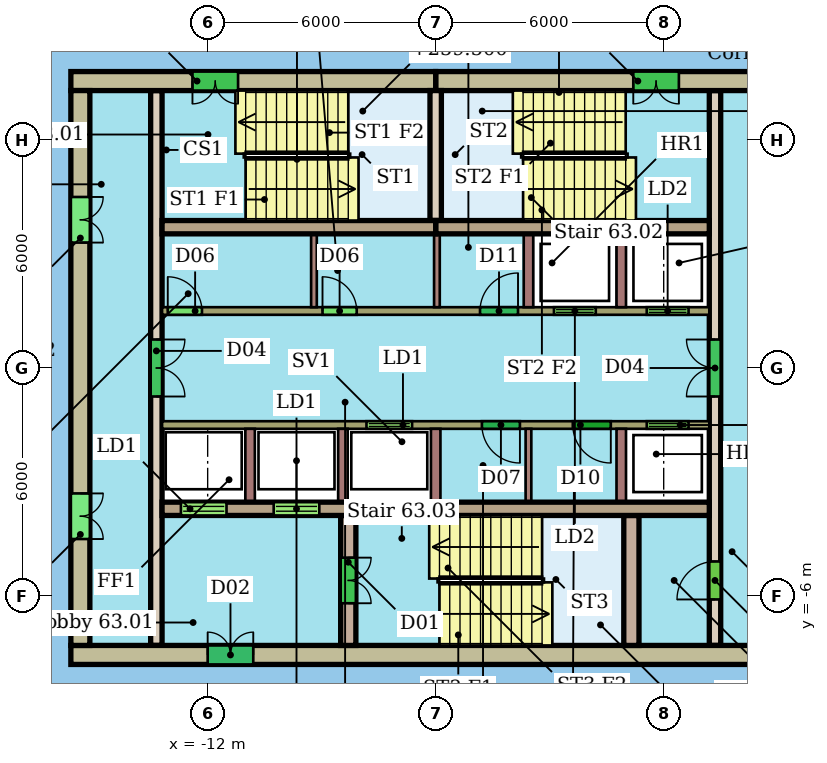
"""IFC4 building model, lengths in metres.
Left out: names, types, materials, properties, quantities, classifications, styles, units other than length and angle.
Written with IfcOpenShell. Run it as: python <this file> out.ifc"""

import sys

from ifc_helpers import new_model, si_unit, direction, frame, frame_2d, origin, place, context, subcontext, project, spatial, rectangle, extrude, element, fill, save


model = new_model("IFC4")
c1 = context("Model", 3, precision=1e-05, world=origin(), true_north=direction((0.0, 1.0)))
c2 = subcontext(c1, "Body", "Model", "MODEL_VIEW")
j1 = project(units=[si_unit("LENGTHUNIT", "METRE"), si_unit("PLANEANGLEUNIT", "RADIAN")], contexts=[c1])
p1 = place(None, origin())
s1 = spatial("IfcSite", under=j1, at=p1, CompositionType="ELEMENT")
p2 = place(p1, origin())
s2 = spatial("IfcBuilding", under=s1, at=p2, CompositionType="ELEMENT")
p3 = place(p2, frame((0.0, 0.0, 257.7)))
s3 = spatial("IfcBuildingStorey", under=s2, at=p3, CompositionType="ELEMENT", Elevation=257.7)
p4 = place(p3, frame((3.6, 7.55, 0.0), z_axis=(0.0, 0.0, 1.0), x_axis=(-1.0, 0.0, 0.0)))
e1 = element("IfcWall", 1, at=p4, inside=s3, PredefinedType="SHEAR", context=c2, shape_type="SweptSolid", body=[
    extrude(rectangle(XDim=9.6, YDim=0.5, at=frame_2d((4.8, 0.0))), origin(), (0.0, 0.0, 1.0), 3.3),
])
p5 = place(p4, frame((3.2, 0.0, 0.0)))
e2 = element("IfcOpeningElement", 2, at=p5, cuts=e1, PredefinedType="OPENING", context=c2, shape_type="SweptSolid", body=[
    extrude(rectangle(XDim=1.2, YDim=2.1, at=frame_2d((0.6, 1.05))), frame((0.0, 0.26, 0.0), z_axis=(0.0, -1.0, 0.0), x_axis=(1.0, 0.0, 0.0)), (0.0, 0.0, 1.0), 0.52),
])
p6 = place(p3, frame((-6.0, 7.55, 0.0), z_axis=(0.0, 0.0, 1.0), x_axis=(-1.0, 0.0, 0.0)))
e3 = element("IfcWall", 3, at=p6, inside=s3, PredefinedType="SHEAR", context=c2, shape_type="SweptSolid", body=[
    extrude(rectangle(XDim=9.6, YDim=0.5, at=frame_2d((4.8, 0.0))), origin(), (0.0, 0.0, 1.0), 3.3),
])
p7 = place(p6, frame((5.2, 0.0, 0.0)))
e4 = element("IfcOpeningElement", 4, at=p7, cuts=e3, PredefinedType="OPENING", context=c2, shape_type="SweptSolid", body=[
    extrude(rectangle(XDim=1.2, YDim=2.1, at=frame_2d((0.6, 1.05))), frame((0.0, 0.26, 0.0), z_axis=(0.0, -1.0, 0.0), x_axis=(1.0, 0.0, 0.0)), (0.0, 0.0, 1.0), 0.52),
])
p8 = place(p3, frame((-15.6, -7.55, 0.0), z_axis=(0.0, 0.0, 1.0), x_axis=(1.0, 0.0, 0.0)))
e5 = element("IfcWall", 5, at=p8, inside=s3, PredefinedType="SHEAR", context=c2, shape_type="SweptSolid", body=[
    extrude(rectangle(XDim=19.2, YDim=0.5, at=frame_2d((9.6, 0.0))), origin(), (0.0, 0.0, 1.0), 3.3),
])
p9 = place(p8, frame((3.6, 0.0, 0.0)))
e6 = element("IfcOpeningElement", 6, at=p9, cuts=e5, PredefinedType="OPENING", context=c2, shape_type="SweptSolid", body=[
    extrude(rectangle(XDim=1.2, YDim=2.1, at=frame_2d((0.6, 1.05))), frame((0.0, 0.26, 0.0), z_axis=(0.0, -1.0, 0.0), x_axis=(1.0, 0.0, 0.0)), (0.0, 0.0, 1.0), 0.52),
])
p10 = place(p3, frame((-15.35, 7.3, 0.0), z_axis=(0.0, 0.0, 1.0), x_axis=(0.0, -1.0, 0.0)))
e7 = element("IfcWall", 7, at=p10, inside=s3, PredefinedType="SHEAR", context=c2, shape_type="SweptSolid", body=[
    extrude(rectangle(XDim=14.6, YDim=0.5, at=frame_2d((7.3, 0.0))), origin(), (0.0, 0.0, 1.0), 3.3),
])
p11 = place(p10, frame((10.6, 0.0, 0.0)))
e8 = element("IfcOpeningElement", 8, at=p11, cuts=e7, PredefinedType="OPENING", context=c2, shape_type="SweptSolid", body=[
    extrude(rectangle(XDim=1.2, YDim=2.1, at=frame_2d((0.6, 1.05))), frame((0.0, 0.26, 0.0), z_axis=(0.0, -1.0, 0.0), x_axis=(1.0, 0.0, 0.0)), (0.0, 0.0, 1.0), 0.52),
])
p12 = place(p10, frame((2.8, 0.0, 0.0)))
e9 = element("IfcOpeningElement", 9, at=p12, cuts=e7, PredefinedType="OPENING", context=c2, shape_type="SweptSolid", body=[
    extrude(rectangle(XDim=1.2, YDim=2.1, at=frame_2d((0.6, 1.05))), frame((0.0, 0.26, 0.0), z_axis=(0.0, -1.0, 0.0), x_axis=(1.0, 0.0, 0.0)), (0.0, 0.0, 1.0), 0.52),
])
for number, where, z_axis, x_axis in (
    (10, (-13.2, 3.705, 0.0), (0.0, 0.0, 1.0), (1.0, 0.0, 0.0)),
    (11, (-6.0, 3.705, 0.0), (0.0, 0.0, 1.0), (1.0, 0.0, 0.0)),
):
    element("IfcWall", number, at=place(p3, frame(where, z_axis=z_axis, x_axis=x_axis)), inside=s3, PredefinedType="SHEAR", context=c2, shape_type="SweptSolid", body=[
        extrude(rectangle(XDim=7.2, YDim=0.35, at=frame_2d((3.6, 0.0))), origin(), (0.0, 0.0, 1.0), 3.3),
    ])
p13 = place(p3, frame((-13.2, -3.705, 0.0), z_axis=(0.0, 0.0, 1.0), x_axis=(1.0, 0.0, 0.0)))
e12 = element("IfcWall", 12, at=p13, inside=s3, PredefinedType="SHEAR", context=c2, shape_type="SweptSolid", body=[
    extrude(rectangle(XDim=7.2, YDim=0.35, at=frame_2d((3.6, 0.0))), origin(), (0.0, 0.0, 1.0), 3.3),
])
p14 = place(p13, frame((0.496, 0.0, 0.0)))
e13 = element("IfcOpeningElement", 13, at=p14, cuts=e12, PredefinedType="OPENING", context=c2, shape_type="SweptSolid", body=[
    extrude(rectangle(XDim=1.2, YDim=2.1, at=frame_2d((0.6, 1.05))), frame((0.0, 0.185, 0.0), z_axis=(0.0, -1.0, 0.0), x_axis=(1.0, 0.0, 0.0)), (0.0, 0.0, 1.0), 0.37),
])
p15 = place(p13, frame((2.938, 0.0, 0.0)))
e14 = element("IfcOpeningElement", 14, at=p15, cuts=e12, PredefinedType="OPENING", context=c2, shape_type="SweptSolid", body=[
    extrude(rectangle(XDim=1.2, YDim=2.1, at=frame_2d((0.6, 1.05))), frame((0.0, 0.185, 0.0), z_axis=(0.0, -1.0, 0.0), x_axis=(1.0, 0.0, 0.0)), (0.0, 0.0, 1.0), 0.37),
])
p16 = place(p3, frame((-6.0, -3.705, 0.0), z_axis=(0.0, 0.0, 1.0), x_axis=(1.0, 0.0, 0.0)))
e15 = element("IfcWall", 15, at=p16, inside=s3, PredefinedType="SHEAR", context=c2, shape_type="SweptSolid", body=[
    extrude(rectangle(XDim=7.2, YDim=0.35, at=frame_2d((3.6, 0.0))), origin(), (0.0, 0.0, 1.0), 3.3),
])
p17 = place(p3, frame((-13.35, 7.3, 0.0), z_axis=(0.0, 0.0, 1.0), x_axis=(0.0, -1.0, 0.0)))
e16 = element("IfcWall", 16, at=p17, inside=s3, PredefinedType="SHEAR", context=c2, shape_type="SweptSolid", body=[
    extrude(rectangle(XDim=14.6, YDim=0.3, at=frame_2d((7.3, 0.0))), origin(), (0.0, 0.0, 1.0), 3.3),
])
p18 = place(p17, frame((6.55, 0.0, 0.0)))
e17 = element("IfcOpeningElement", 17, at=p18, cuts=e16, PredefinedType="OPENING", context=c2, shape_type="SweptSolid", body=[
    extrude(rectangle(XDim=1.5, YDim=2.1, at=frame_2d((0.75, 1.05))), frame((0.0, 0.16, 0.0), z_axis=(0.0, -1.0, 0.0), x_axis=(1.0, 0.0, 0.0)), (0.0, 0.0, 1.0), 0.32),
])
p19 = place(p3, frame((1.35, -7.3, 0.0), z_axis=(0.0, 0.0, 1.0), x_axis=(0.0, 1.0, 0.0)))
e18 = element("IfcWall", 18, at=p19, inside=s3, PredefinedType="SHEAR", context=c2, shape_type="SweptSolid", body=[
    extrude(rectangle(XDim=14.6, YDim=0.3, at=frame_2d((7.3, 0.0))), origin(), (0.0, 0.0, 1.0), 3.3),
])
p20 = place(p19, frame((1.21, 0.0, 0.0)))
e19 = element("IfcOpeningElement", 19, at=p20, cuts=e18, PredefinedType="OPENING", context=c2, shape_type="SweptSolid", body=[
    extrude(rectangle(XDim=1.0, YDim=2.1, at=frame_2d((0.5, 1.05))), frame((0.0, 0.16, 0.0), z_axis=(0.0, -1.0, 0.0), x_axis=(1.0, 0.0, 0.0)), (0.0, 0.0, 1.0), 0.32),
])
p21 = place(p19, frame((6.55, 0.0, 0.0)))
e20 = element("IfcOpeningElement", 20, at=p21, cuts=e18, PredefinedType="OPENING", context=c2, shape_type="SweptSolid", body=[
    extrude(rectangle(XDim=1.5, YDim=2.1, at=frame_2d((0.75, 1.05))), frame((0.0, 0.16, 0.0), z_axis=(0.0, -1.0, 0.0), x_axis=(1.0, 0.0, 0.0)), (0.0, 0.0, 1.0), 0.32),
])
p22 = place(p3, frame((-13.2, 1.5, 0.0), z_axis=(0.0, 0.0, 1.0), x_axis=(1.0, 0.0, 0.0)))
e21 = element("IfcWall", 21, at=p22, inside=s3, PredefinedType="SHEAR", context=c2, shape_type="SweptSolid", body=[
    extrude(rectangle(XDim=14.4, YDim=0.2, at=frame_2d((7.2, 0.0))), origin(), (0.0, 0.0, 1.0), 3.3),
])
p23 = place(p22, frame((10.312, 0.0, 0.0)))
e22 = element("IfcOpeningElement", 22, at=p23, cuts=e21, PredefinedType="OPENING", context=c2, shape_type="SweptSolid", body=[
    extrude(rectangle(XDim=1.1, YDim=2.1, at=frame_2d((0.55, 1.05))), frame((0.0, 0.11, 0.0), z_axis=(0.0, -1.0, 0.0), x_axis=(1.0, 0.0, 0.0)), (0.0, 0.0, 1.0), 0.22),
])
p24 = place(p22, frame((12.754, 0.0, 0.0)))
e23 = element("IfcOpeningElement", 23, at=p24, cuts=e21, PredefinedType="OPENING", context=c2, shape_type="SweptSolid", body=[
    extrude(rectangle(XDim=1.1, YDim=2.1, at=frame_2d((0.55, 1.05))), frame((0.0, 0.11, 0.0), z_axis=(0.0, -1.0, 0.0), x_axis=(1.0, 0.0, 0.0)), (0.0, 0.0, 1.0), 0.22),
])
p25 = place(p22, frame((0.15, 0.0, 0.0)))
e24 = element("IfcOpeningElement", 24, at=p25, cuts=e21, PredefinedType="OPENING", context=c2, shape_type="SweptSolid", body=[
    extrude(rectangle(XDim=0.9, YDim=2.1, at=frame_2d((0.45, 1.05))), frame((0.0, 0.11, 0.0), z_axis=(0.0, -1.0, 0.0), x_axis=(1.0, 0.0, 0.0)), (0.0, 0.0, 1.0), 0.22),
])
p26 = place(p22, frame((4.222, 0.0, 0.0)))
e25 = element("IfcOpeningElement", 25, at=p26, cuts=e21, PredefinedType="OPENING", context=c2, shape_type="SweptSolid", body=[
    extrude(rectangle(XDim=0.9, YDim=2.1, at=frame_2d((0.45, 1.05))), frame((0.0, 0.11, 0.0), z_axis=(0.0, -1.0, 0.0), x_axis=(1.0, 0.0, 0.0)), (0.0, 0.0, 1.0), 0.22),
])
p27 = place(p22, frame((8.367, 0.0, 0.0)))
e26 = element("IfcOpeningElement", 26, at=p27, cuts=e21, PredefinedType="OPENING", context=c2, shape_type="SweptSolid", body=[
    extrude(rectangle(XDim=1.0, YDim=2.1, at=frame_2d((0.5, 1.05))), frame((0.0, 0.11, 0.0), z_axis=(0.0, -1.0, 0.0), x_axis=(1.0, 0.0, 0.0)), (0.0, 0.0, 1.0), 0.22),
])
p28 = place(p3, frame((1.2, -1.5, 0.0), z_axis=(0.0, 0.0, 1.0), x_axis=(-1.0, 0.0, 0.0)))
e27 = element("IfcWall", 27, at=p28, inside=s3, PredefinedType="SHEAR", context=c2, shape_type="SweptSolid", body=[
    extrude(rectangle(XDim=14.4, YDim=0.2, at=frame_2d((7.2, 0.0))), origin(), (0.0, 0.0, 1.0), 3.3),
])
p29 = place(p28, frame((7.821, 0.0, 0.0)))
e28 = element("IfcOpeningElement", 28, at=p29, cuts=e27, PredefinedType="OPENING", context=c2, shape_type="SweptSolid", body=[
    extrude(rectangle(XDim=1.2, YDim=2.1, at=frame_2d((0.6, 1.05))), frame((0.0, 0.11, 0.0), z_axis=(0.0, -1.0, 0.0), x_axis=(1.0, 0.0, 0.0)), (0.0, 0.0, 1.0), 0.22),
])
p30 = place(p28, frame((0.546, 0.0, 0.0)))
e29 = element("IfcOpeningElement", 29, at=p30, cuts=e27, PredefinedType="OPENING", context=c2, shape_type="SweptSolid", body=[
    extrude(rectangle(XDim=1.1, YDim=2.1, at=frame_2d((0.55, 1.05))), frame((0.0, 0.11, 0.0), z_axis=(0.0, -1.0, 0.0), x_axis=(1.0, 0.0, 0.0)), (0.0, 0.0, 1.0), 0.22),
])
p31 = place(p28, frame((4.983, 0.0, 0.0)))
e30 = element("IfcOpeningElement", 30, at=p31, cuts=e27, PredefinedType="OPENING", context=c2, shape_type="SweptSolid", body=[
    extrude(rectangle(XDim=1.0, YDim=2.1, at=frame_2d((0.5, 1.05))), frame((0.0, 0.11, 0.0), z_axis=(0.0, -1.0, 0.0), x_axis=(1.0, 0.0, 0.0)), (0.0, 0.0, 1.0), 0.22),
])
p32 = place(p28, frame((2.592, 0.0, 0.0)))
e31 = element("IfcOpeningElement", 31, at=p32, cuts=e27, PredefinedType="OPENING", context=c2, shape_type="SweptSolid", body=[
    extrude(rectangle(XDim=1.0, YDim=2.1, at=frame_2d((0.5, 1.05))), frame((0.0, 0.11, 0.0), z_axis=(0.0, -1.0, 0.0), x_axis=(1.0, 0.0, 0.0)), (0.0, 0.0, 1.0), 0.22),
])
p33 = place(p3, frame((-8.3, -3.88, 0.0), z_axis=(0.0, 0.0, 1.0), x_axis=(0.0, -1.0, 0.0)))
e32 = element("IfcWall", 32, at=p33, inside=s3, PredefinedType="SHEAR", context=c2, shape_type="SweptSolid", body=[
    extrude(rectangle(XDim=3.42, YDim=0.4, at=frame_2d((1.71, 0.0))), origin(), (0.0, 0.0, 1.0), 3.3),
])
p34 = place(p33, frame((1.11, 0.0, 0.0)))
e33 = element("IfcOpeningElement", 33, at=p34, cuts=e32, PredefinedType="OPENING", context=c2, shape_type="SweptSolid", body=[
    extrude(rectangle(XDim=1.2, YDim=2.1, at=frame_2d((0.6, 1.05))), frame((0.0, 0.21, 0.0), z_axis=(0.0, -1.0, 0.0), x_axis=(1.0, 0.0, 0.0)), (0.0, 0.0, 1.0), 0.42),
])
p35 = place(p3, frame((-0.85, -3.88, 0.0), z_axis=(0.0, 0.0, 1.0), x_axis=(0.0, -1.0, 0.0)))
e34 = element("IfcWall", 34, at=p35, inside=s3, PredefinedType="SHEAR", context=c2, shape_type="SweptSolid", body=[
    extrude(rectangle(XDim=3.42, YDim=0.4, at=frame_2d((1.71, 0.0))), origin(), (0.0, 0.0, 1.0), 3.3),
])
p36 = place(p3, frame((-6.0, 3.88, 0.0), z_axis=(0.0, 0.0, 1.0), x_axis=(0.0, 1.0, 0.0)))
e35 = element("IfcWall", 35, at=p36, inside=s3, PredefinedType="SHEAR", context=c2, shape_type="SweptSolid", body=[
    extrude(rectangle(XDim=3.42, YDim=0.3, at=frame_2d((1.71, 0.0))), origin(), (0.0, 0.0, 1.0), 3.3),
])
for number, where, z_axis, x_axis in (
    (36, (-3.558, 1.6, 0.0), (0.0, 0.0, 1.0), (0.0, 1.0, 0.0)),
    (37, (-1.117, 1.6, 0.0), (0.0, 0.0, 1.0), (0.0, 1.0, 0.0)),
):
    element("IfcWall", number, at=place(p3, frame(where, z_axis=z_axis, x_axis=x_axis)), inside=s3, PredefinedType="SHEAR", context=c2, shape_type="SweptSolid", body=[
        extrude(rectangle(XDim=1.93, YDim=0.25, at=frame_2d((0.965, 0.0))), origin(), (0.0, 0.0, 1.0), 3.3),
    ])
for number, where, z_axis, x_axis in (
    (38, (-9.203, 1.6, 0.0), (0.0, 0.0, 1.0), (0.0, 1.0, 0.0)),
    (39, (-5.967, 1.6, 0.0), (0.0, 0.0, 1.0), (0.0, 1.0, 0.0)),
):
    element("IfcWall", number, at=place(p3, frame(where, z_axis=z_axis, x_axis=x_axis)), inside=s3, PredefinedType="PARTITIONING", context=c2, shape_type="SweptSolid", body=[
        extrude(rectangle(XDim=1.93, YDim=0.15, at=frame_2d((0.965, 0.0))), origin(), (0.0, 0.0, 1.0), 3.3),
    ])
for number, where, z_axis, x_axis in (
    (40, (-10.883, -1.6, 0.0), (0.0, 0.0, 1.0), (0.0, -1.0, 0.0)),
    (41, (-8.442, -1.6, 0.0), (0.0, 0.0, 1.0), (0.0, -1.0, 0.0)),
    (42, (-6.0, -1.6, 0.0), (0.0, 0.0, 1.0), (0.0, -1.0, 0.0)),
    (43, (-1.117, -1.6, 0.0), (0.0, 0.0, 1.0), (0.0, -1.0, 0.0)),
):
    element("IfcWall", number, at=place(p3, frame(where, z_axis=z_axis, x_axis=x_axis)), inside=s3, PredefinedType="SHEAR", context=c2, shape_type="SweptSolid", body=[
        extrude(rectangle(XDim=1.93, YDim=0.25, at=frame_2d((0.965, 0.0))), origin(), (0.0, 0.0, 1.0), 3.3),
    ])
p37 = place(p3, frame((-3.558, -1.6, 0.0), z_axis=(0.0, 0.0, 1.0), x_axis=(0.0, -1.0, 0.0)))
e44 = element("IfcWall", 44, at=p37, inside=s3, PredefinedType="PARTITIONING", context=c2, shape_type="SweptSolid", body=[
    extrude(rectangle(XDim=1.93, YDim=0.15, at=frame_2d((0.965, 0.0))), origin(), (0.0, 0.0, 1.0), 3.3),
])
p38 = place(p5, origin())
e45 = element("IfcDoor", 45, at=p38, inside=s3, OperationType="DOUBLE_DOOR_SINGLE_SWING", PredefinedType="NOTDEFINED", context=c2, shape_type="SweptSolid", body=[
    extrude(rectangle(XDim=1.2, YDim=2.1, at=frame_2d((0.6, 1.05))), frame((0.0, 0.025, 0.0), z_axis=(0.0, -1.0, 0.0), x_axis=(1.0, 0.0, 0.0)), (0.0, 0.0, 1.0), 0.05),
])
fill(e2, e45)
p39 = place(p7, origin())
e46 = element("IfcDoor", 46, at=p39, inside=s3, OperationType="DOUBLE_DOOR_SINGLE_SWING", PredefinedType="NOTDEFINED", context=c2, shape_type="SweptSolid", body=[
    extrude(rectangle(XDim=1.2, YDim=2.1, at=frame_2d((0.6, 1.05))), frame((0.0, 0.025, 0.0), z_axis=(0.0, -1.0, 0.0), x_axis=(1.0, 0.0, 0.0)), (0.0, 0.0, 1.0), 0.05),
])
fill(e4, e46)
p40 = place(p9, origin())
e47 = element("IfcDoor", 47, at=p40, inside=s3, OperationType="DOUBLE_DOOR_SINGLE_SWING", PredefinedType="NOTDEFINED", context=c2, shape_type="SweptSolid", body=[
    extrude(rectangle(XDim=1.2, YDim=2.1, at=frame_2d((0.6, 1.05))), frame((0.0, 0.025, 0.0), z_axis=(0.0, -1.0, 0.0), x_axis=(1.0, 0.0, 0.0)), (0.0, 0.0, 1.0), 0.05),
])
fill(e6, e47)
p41 = place(p11, origin())
e48 = element("IfcDoor", 48, at=p41, inside=s3, OperationType="DOUBLE_DOOR_SINGLE_SWING", PredefinedType="NOTDEFINED", context=c2, shape_type="SweptSolid", body=[
    extrude(rectangle(XDim=1.2, YDim=2.1, at=frame_2d((0.6, 1.05))), frame((0.0, 0.025, 0.0), z_axis=(0.0, -1.0, 0.0), x_axis=(1.0, 0.0, 0.0)), (0.0, 0.0, 1.0), 0.05),
])
fill(e8, e48)
p42 = place(p12, origin())
e49 = element("IfcDoor", 49, at=p42, inside=s3, OperationType="DOUBLE_DOOR_SINGLE_SWING", PredefinedType="NOTDEFINED", context=c2, shape_type="SweptSolid", body=[
    extrude(rectangle(XDim=1.2, YDim=2.1, at=frame_2d((0.6, 1.05))), frame((0.0, 0.025, 0.0), z_axis=(0.0, -1.0, 0.0), x_axis=(1.0, 0.0, 0.0)), (0.0, 0.0, 1.0), 0.05),
])
fill(e9, e49)
p43 = place(p14, origin())
e50 = element("IfcDoor", 50, at=p43, inside=s3, OperationType="DOUBLE_DOOR_SLIDING", PredefinedType="NOTDEFINED", context=c2, shape_type="SweptSolid", body=[
    extrude(rectangle(XDim=1.2, YDim=2.1, at=frame_2d((0.6, 1.05))), frame((0.0, 0.025, 0.0), z_axis=(0.0, -1.0, 0.0), x_axis=(1.0, 0.0, 0.0)), (0.0, 0.0, 1.0), 0.05),
])
fill(e13, e50)
p44 = place(p15, origin())
e51 = element("IfcDoor", 51, at=p44, inside=s3, OperationType="DOUBLE_DOOR_SLIDING", PredefinedType="NOTDEFINED", context=c2, shape_type="SweptSolid", body=[
    extrude(rectangle(XDim=1.2, YDim=2.1, at=frame_2d((0.6, 1.05))), frame((0.0, 0.025, 0.0), z_axis=(0.0, -1.0, 0.0), x_axis=(1.0, 0.0, 0.0)), (0.0, 0.0, 1.0), 0.05),
])
fill(e14, e51)
p45 = place(p18, origin())
e52 = element("IfcDoor", 52, at=p45, inside=s3, OperationType="DOUBLE_DOOR_SINGLE_SWING", PredefinedType="NOTDEFINED", context=c2, shape_type="SweptSolid", body=[
    extrude(rectangle(XDim=1.5, YDim=2.1, at=frame_2d((0.75, 1.05))), frame((0.0, 0.025, 0.0), z_axis=(0.0, -1.0, 0.0), x_axis=(1.0, 0.0, 0.0)), (0.0, 0.0, 1.0), 0.05),
])
fill(e17, e52)
p46 = place(p20, origin())
e53 = element("IfcDoor", 53, at=p46, inside=s3, OperationType="SINGLE_SWING_LEFT", PredefinedType="NOTDEFINED", context=c2, shape_type="SweptSolid", body=[
    extrude(rectangle(XDim=1.0, YDim=2.1, at=frame_2d((0.5, 1.05))), frame((0.0, 0.025, 0.0), z_axis=(0.0, -1.0, 0.0), x_axis=(1.0, 0.0, 0.0)), (0.0, 0.0, 1.0), 0.05),
])
fill(e19, e53)
p47 = place(p21, origin())
e54 = element("IfcDoor", 54, at=p47, inside=s3, OperationType="DOUBLE_DOOR_SINGLE_SWING", PredefinedType="NOTDEFINED", context=c2, shape_type="SweptSolid", body=[
    extrude(rectangle(XDim=1.5, YDim=2.1, at=frame_2d((0.75, 1.05))), frame((0.0, 0.025, 0.0), z_axis=(0.0, -1.0, 0.0), x_axis=(1.0, 0.0, 0.0)), (0.0, 0.0, 1.0), 0.05),
])
fill(e20, e54)
p48 = place(p23, origin())
e55 = element("IfcDoor", 55, at=p48, inside=s3, OperationType="DOUBLE_DOOR_SLIDING", PredefinedType="NOTDEFINED", context=c2, shape_type="SweptSolid", body=[
    extrude(rectangle(XDim=1.1, YDim=2.1, at=frame_2d((0.55, 1.05))), frame((0.0, 0.025, 0.0), z_axis=(0.0, -1.0, 0.0), x_axis=(1.0, 0.0, 0.0)), (0.0, 0.0, 1.0), 0.05),
])
fill(e22, e55)
p49 = place(p24, origin())
e56 = element("IfcDoor", 56, at=p49, inside=s3, OperationType="DOUBLE_DOOR_SLIDING", PredefinedType="NOTDEFINED", context=c2, shape_type="SweptSolid", body=[
    extrude(rectangle(XDim=1.1, YDim=2.1, at=frame_2d((0.55, 1.05))), frame((0.0, 0.025, 0.0), z_axis=(0.0, -1.0, 0.0), x_axis=(1.0, 0.0, 0.0)), (0.0, 0.0, 1.0), 0.05),
])
fill(e23, e56)
p50 = place(p25, origin())
e57 = element("IfcDoor", 57, at=p50, inside=s3, OperationType="SINGLE_SWING_LEFT", PredefinedType="NOTDEFINED", context=c2, shape_type="SweptSolid", body=[
    extrude(rectangle(XDim=0.9, YDim=2.1, at=frame_2d((0.45, 1.05))), frame((0.0, 0.025, 0.0), z_axis=(0.0, -1.0, 0.0), x_axis=(1.0, 0.0, 0.0)), (0.0, 0.0, 1.0), 0.05),
])
fill(e24, e57)
p51 = place(p26, origin())
e58 = element("IfcDoor", 58, at=p51, inside=s3, OperationType="SINGLE_SWING_LEFT", PredefinedType="NOTDEFINED", context=c2, shape_type="SweptSolid", body=[
    extrude(rectangle(XDim=0.9, YDim=2.1, at=frame_2d((0.45, 1.05))), frame((0.0, 0.025, 0.0), z_axis=(0.0, -1.0, 0.0), x_axis=(1.0, 0.0, 0.0)), (0.0, 0.0, 1.0), 0.05),
])
fill(e25, e58)
p52 = place(p27, origin())
e59 = element("IfcDoor", 59, at=p52, inside=s3, OperationType="SINGLE_SWING_RIGHT", PredefinedType="NOTDEFINED", context=c2, shape_type="SweptSolid", body=[
    extrude(rectangle(XDim=1.0, YDim=2.1, at=frame_2d((0.5, 1.05))), frame((0.0, 0.025, 0.0), z_axis=(0.0, -1.0, 0.0), x_axis=(1.0, 0.0, 0.0)), (0.0, 0.0, 1.0), 0.05),
])
fill(e26, e59)
p53 = place(p29, origin())
e60 = element("IfcDoor", 60, at=p53, inside=s3, OperationType="DOUBLE_DOOR_SLIDING", PredefinedType="NOTDEFINED", context=c2, shape_type="SweptSolid", body=[
    extrude(rectangle(XDim=1.2, YDim=2.1, at=frame_2d((0.6, 1.05))), frame((0.0, 0.025, 0.0), z_axis=(0.0, -1.0, 0.0), x_axis=(1.0, 0.0, 0.0)), (0.0, 0.0, 1.0), 0.05),
])
fill(e28, e60)
p54 = place(p30, origin())
e61 = element("IfcDoor", 61, at=p54, inside=s3, OperationType="DOUBLE_DOOR_SLIDING", PredefinedType="NOTDEFINED", context=c2, shape_type="SweptSolid", body=[
    extrude(rectangle(XDim=1.1, YDim=2.1, at=frame_2d((0.55, 1.05))), frame((0.0, 0.025, 0.0), z_axis=(0.0, -1.0, 0.0), x_axis=(1.0, 0.0, 0.0)), (0.0, 0.0, 1.0), 0.05),
])
fill(e29, e61)
p55 = place(p31, origin())
e62 = element("IfcDoor", 62, at=p55, inside=s3, OperationType="SINGLE_SWING_LEFT", PredefinedType="NOTDEFINED", context=c2, shape_type="SweptSolid", body=[
    extrude(rectangle(XDim=1.0, YDim=2.1, at=frame_2d((0.5, 1.05))), frame((0.0, 0.025, 0.0), z_axis=(0.0, -1.0, 0.0), x_axis=(1.0, 0.0, 0.0)), (0.0, 0.0, 1.0), 0.05),
])
fill(e30, e62)
p56 = place(p32, origin())
e63 = element("IfcDoor", 63, at=p56, inside=s3, OperationType="SINGLE_SWING_LEFT", PredefinedType="NOTDEFINED", context=c2, shape_type="SweptSolid", body=[
    extrude(rectangle(XDim=1.0, YDim=2.1, at=frame_2d((0.5, 1.05))), frame((0.0, 0.025, 0.0), z_axis=(0.0, -1.0, 0.0), x_axis=(1.0, 0.0, 0.0)), (0.0, 0.0, 1.0), 0.05),
])
fill(e31, e63)
p57 = place(p34, origin())
e64 = element("IfcDoor", 64, at=p57, inside=s3, OperationType="DOUBLE_DOOR_SINGLE_SWING", PredefinedType="NOTDEFINED", context=c2, shape_type="SweptSolid", body=[
    extrude(rectangle(XDim=1.2, YDim=2.1, at=frame_2d((0.6, 1.05))), frame((0.0, 0.025, 0.0), z_axis=(0.0, -1.0, 0.0), x_axis=(1.0, 0.0, 0.0)), (0.0, 0.0, 1.0), 0.05),
])
fill(e33, e64)
save(model, sys.argv[1])
